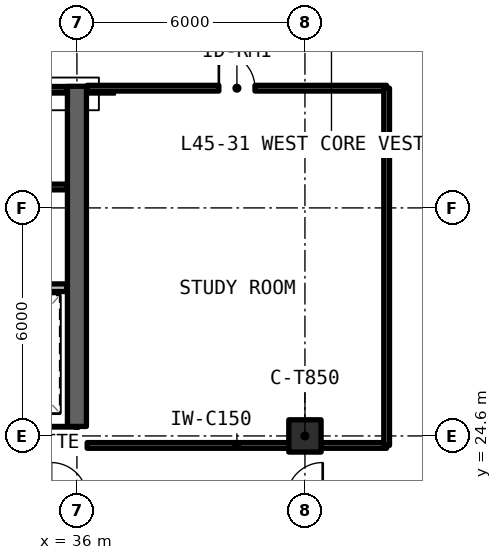
"""IFC4 building model, lengths in metres.
Left out: names, types, materials, properties, quantities, classifications, styles, units other than length and angle.
Written with IfcOpenShell. Run it as: python <this file> out.ifc"""

import sys

from ifc_helpers import new_model, si_unit, direction, frame, frame_2d, origin, origin_2d, place, context, subcontext, project, spatial, rectangle, extrude, element, fill, save


model = new_model("IFC4")
c1 = context("Model", 3, precision=1e-05, world=origin(), true_north=direction((0.0, 1.0)))
c2 = subcontext(c1, "Body", "Model", "MODEL_VIEW")
j1 = project(units=[si_unit("LENGTHUNIT", "METRE"), si_unit("PLANEANGLEUNIT", "RADIAN")], contexts=[c1])
p1 = place(None, origin())
s1 = spatial("IfcSite", under=j1, at=p1, CompositionType="ELEMENT")
p2 = place(p1, origin())
s2 = spatial("IfcBuilding", under=s1, at=p2, CompositionType="ELEMENT")
p3 = place(p2, frame((0.0, 0.0, 162.03)))
s3 = spatial("IfcBuildingStorey", under=s2, at=p3, CompositionType="ELEMENT", Elevation=162.03)
p4 = place(p3, frame((24.0, 24.6, 0.0), z_axis=(0.0, 0.0, 1.0), x_axis=(1.0, 0.0, 0.0)))
e1 = element("IfcWall", 1, at=p4, inside=s3, PredefinedType="SHEAR", context=c2, shape_type="SweptSolid", body=[
    extrude(rectangle(XDim=12.0, YDim=0.5, at=frame_2d((6.0, 0.0))), origin(), (0.0, 0.0, 1.0), 3.63),
])
p5 = place(p3, frame((36.0, 24.85, 0.0), z_axis=(0.0, 0.0, 1.0), x_axis=(0.0, 1.0, 0.0)))
e2 = element("IfcWall", 2, at=p5, inside=s3, PredefinedType="SHEAR", context=c2, shape_type="SweptSolid", body=[
    extrude(rectangle(XDim=8.95, YDim=0.5, at=frame_2d((4.475, 0.0))), origin(), (0.0, 0.0, 1.0), 3.63),
])
p6 = place(p3, frame((42.0, 24.6, 0.0), z_axis=(0.0, 0.0, 1.0), x_axis=(1.0, 0.0, 0.0)))
e3 = element("IfcColumn", 3, at=p6, inside=s3, PredefinedType="COLUMN", context=c2, shape_type="SweptSolid", body=[
    extrude(rectangle(XDim=0.85, YDim=0.85, at=origin_2d()), origin(), (0.0, 0.0, 1.0), 3.63),
])
p7 = place(p3, frame((28.22, 28.5, 0.0), z_axis=(0.0, 0.0, 1.0), x_axis=(1.0, 0.0, 0.0)))
e4 = element("IfcWall", 4, at=p7, inside=s3, PredefinedType="SOLIDWALL", context=c2, shape_type="SweptSolid", body=[
    extrude(rectangle(XDim=7.51, YDim=0.2, at=frame_2d((3.755, 0.0))), origin(), (0.0, 0.0, 1.0), 2.63),
])
p8 = place(p7, frame((2.98, 0.0, 0.0)))
e5 = element("IfcOpeningElement", 5, at=p8, cuts=e4, PredefinedType="OPENING", context=c2, shape_type="SweptSolid", body=[
    extrude(rectangle(XDim=1.0, YDim=2.15, at=frame_2d((0.5, 1.075))), frame((0.0, 0.11, 0.0), z_axis=(0.0, -1.0, 0.0), x_axis=(1.0, 0.0, 0.0)), (0.0, 0.0, 1.0), 0.22),
])
for number, where, z_axis, x_axis in (
    (6, (32.68, 31.15, 0.0), (0.0, 0.0, 1.0), (1.0, 0.0, 0.0)),
    (7, (32.68, 33.72, 0.0), (0.0, 0.0, 1.0), (1.0, 0.0, 0.0)),
):
    element("IfcWall", number, at=place(p3, frame(where, z_axis=z_axis, x_axis=x_axis)), inside=s3, PredefinedType="SOLIDWALL", context=c2, shape_type="SweptSolid", body=[
        extrude(rectangle(XDim=3.05, YDim=0.15, at=frame_2d((1.525, 0.0))), origin(), (0.0, 0.0, 1.0), 2.63),
    ])
p9 = place(p3, frame((36.27, 24.35, 0.0), z_axis=(0.0, 0.0, 1.0), x_axis=(1.0, 0.0, 0.0)))
e8 = element("IfcWall", 8, at=p9, inside=s3, PredefinedType="SOLIDWALL", context=c2, shape_type="SweptSolid", body=[
    extrude(rectangle(XDim=7.88, YDim=0.15, at=frame_2d((3.94, 0.0))), origin(), (0.0, 0.0, 1.0), 2.63),
])
p10 = place(p3, frame((36.27, 33.75, 0.0), z_axis=(0.0, 0.0, 1.0), x_axis=(1.0, 0.0, 0.0)))
e9 = element("IfcWall", 9, at=p10, inside=s3, PredefinedType="SOLIDWALL", context=c2, shape_type="SweptSolid", body=[
    extrude(rectangle(XDim=7.88, YDim=0.15, at=frame_2d((3.94, 0.0))), origin(), (0.0, 0.0, 1.0), 2.63),
])
p11 = place(p10, frame((3.465, 0.0, 0.0)))
e10 = element("IfcOpeningElement", 10, at=p11, cuts=e9, PredefinedType="OPENING", context=c2, shape_type="SweptSolid", body=[
    extrude(rectangle(XDim=0.95, YDim=2.15, at=frame_2d((0.475, 1.075))), frame((0.0, 0.085, 0.0), z_axis=(0.0, -1.0, 0.0), x_axis=(1.0, 0.0, 0.0)), (0.0, 0.0, 1.0), 0.17),
])
p12 = place(p3, frame((44.15, 24.35, 0.0), z_axis=(0.0, 0.0, 1.0), x_axis=(0.0, 1.0, 0.0)))
e11 = element("IfcWall", 11, at=p12, inside=s3, PredefinedType="SOLIDWALL", context=c2, shape_type="SweptSolid", body=[
    extrude(rectangle(XDim=9.4, YDim=0.15, at=frame_2d((4.7, 0.0))), origin(), (0.0, 0.0, 1.0), 2.63),
])
p13 = place(p11, origin())
e12 = element("IfcDoor", 12, at=p13, inside=s3, OperationType="SINGLE_SWING_LEFT", PredefinedType="DOOR", context=c2, shape_type="SweptSolid", body=[
    extrude(rectangle(XDim=0.95, YDim=2.15, at=frame_2d((0.475, 1.075))), frame((0.0, 0.025, 0.0), z_axis=(0.0, -1.0, 0.0), x_axis=(1.0, 0.0, 0.0)), (0.0, 0.0, 1.0), 0.05),
])
fill(e10, e12)
save(model, sys.argv[1])
